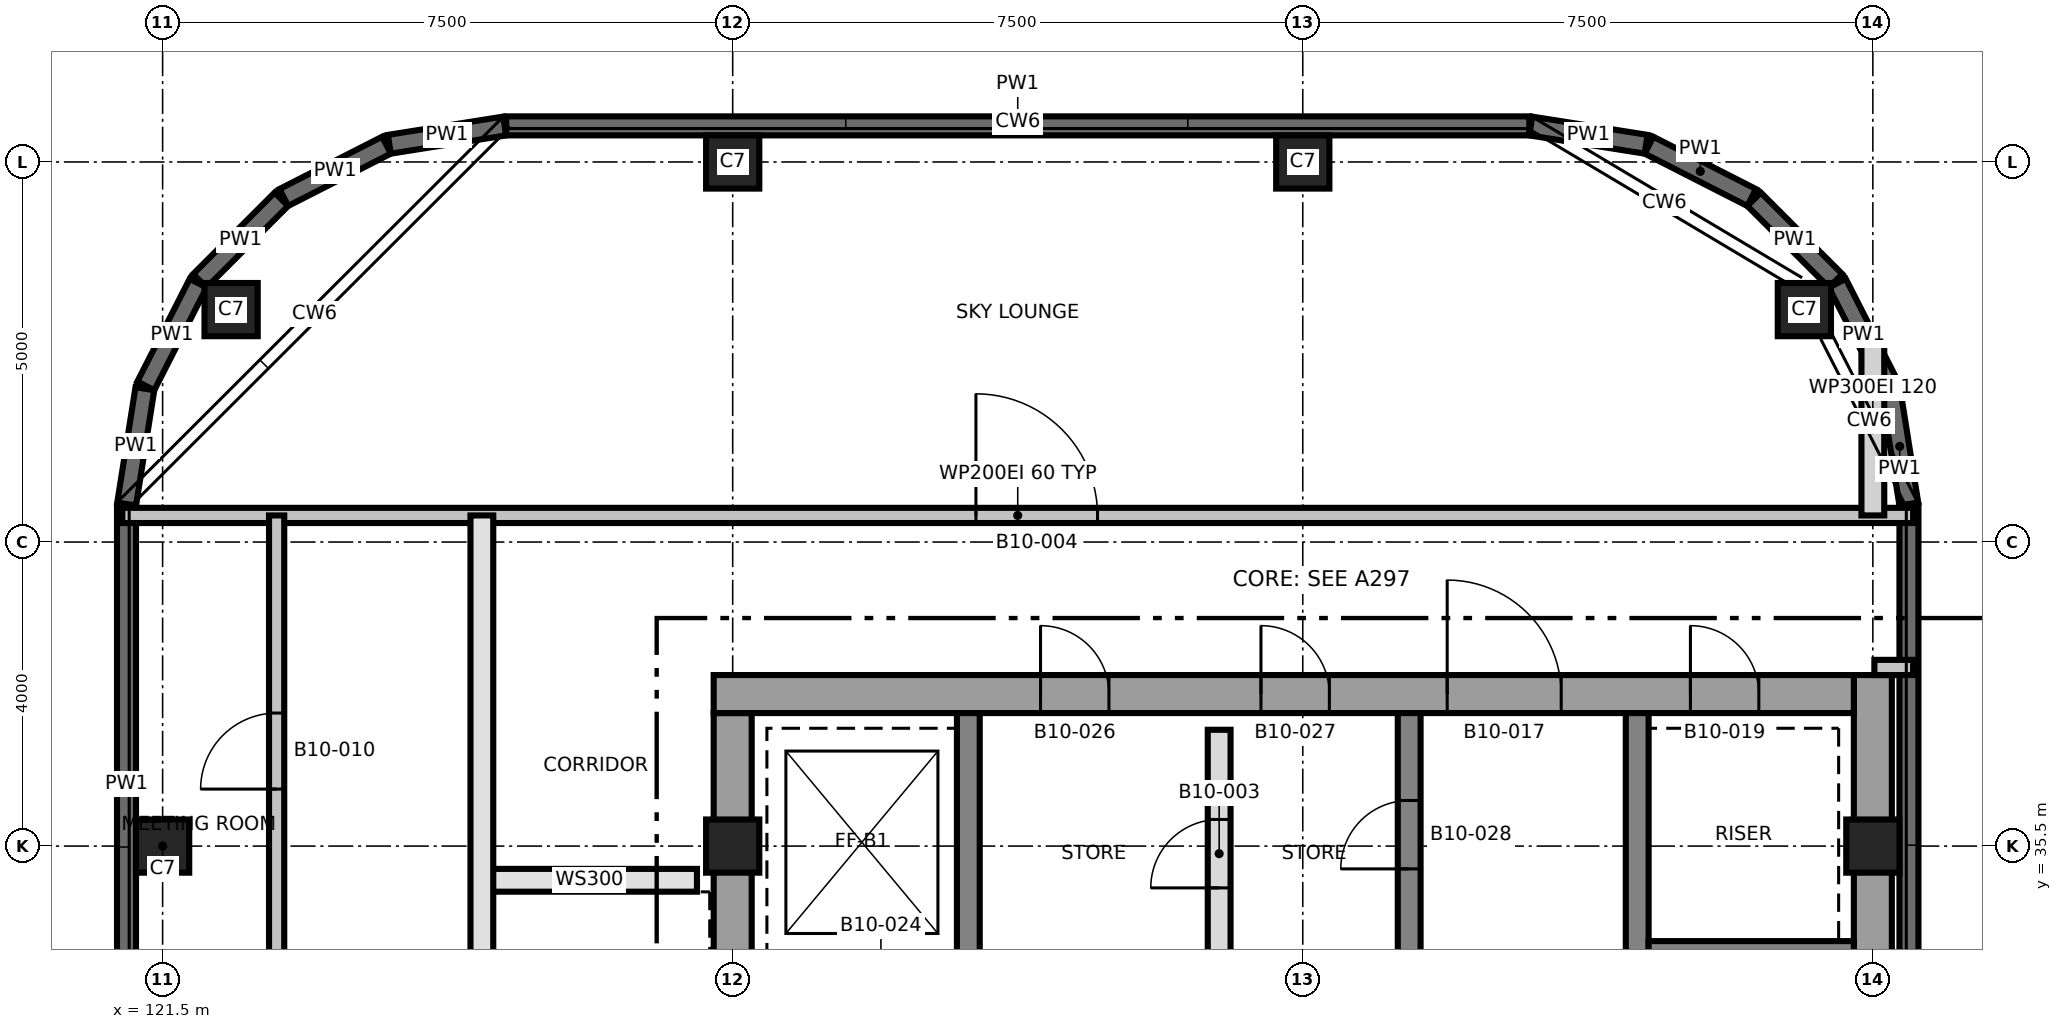
"""IFC4 building model, lengths in metres.
Left out: names, types, materials, properties, quantities, classifications, styles, units other than length and angle.
Written with IfcOpenShell. Run it as: python <this file> out.ifc"""

import sys

from ifc_helpers import new_model, si_unit, direction, frame, frame_2d, origin, origin_2d, place, context, subcontext, project, spatial, rectangle, extrude, element, fill, save


model = new_model("IFC4")
c1 = context("Model", 3, precision=1e-05, world=origin(), true_north=direction((0.0, 1.0)))
c2 = subcontext(c1, "Body", "Model", "MODEL_VIEW")
j1 = project(units=[si_unit("LENGTHUNIT", "METRE"), si_unit("PLANEANGLEUNIT", "RADIAN")], contexts=[c1])
p1 = place(None, origin())
s1 = spatial("IfcSite", under=j1, at=p1, CompositionType="ELEMENT")
p2 = place(p1, origin())
s2 = spatial("IfcBuilding", under=s1, at=p2, CompositionType="ELEMENT")
p3 = place(p2, frame((0.0, 0.0, 101.9)))
s3 = spatial("IfcBuildingStorey", under=s2, at=p3, CompositionType="ELEMENT", Elevation=101.9)
p4 = place(p3, frame((129.0, 24.75, 0.0), z_axis=(0.0, 0.0, 1.0), x_axis=(0.0, 1.0, 0.0)))
e1 = element("IfcWall", 1, at=p4, inside=s3, PredefinedType="SHEAR", context=c2, shape_type="SweptSolid", body=[
    extrude(rectangle(XDim=12.5, YDim=0.5, at=frame_2d((6.25, 0.0))), origin(), (0.0, 0.0, 1.0), 3.7),
])
p5 = place(p4, frame((5.15, 0.0, 0.0)))
e2 = element("IfcOpeningElement", 2, at=p5, cuts=e1, PredefinedType="OPENING", context=c2, shape_type="SweptSolid", body=[
    extrude(rectangle(XDim=1.0, YDim=2.1, at=frame_2d((0.5, 1.05))), frame((0.0, 0.26, 0.0), z_axis=(0.0, -1.0, 0.0), x_axis=(1.0, 0.0, 0.0)), (0.0, 0.0, 1.0), 0.52),
])
p6 = place(p3, frame((144.0, 24.25, 0.0), z_axis=(0.0, 0.0, 1.0), x_axis=(0.0, 1.0, 0.0)))
e3 = element("IfcWall", 3, at=p6, inside=s3, PredefinedType="SHEAR", context=c2, shape_type="SweptSolid", body=[
    extrude(rectangle(XDim=13.5, YDim=0.5, at=frame_2d((6.75, 0.0))), origin(), (0.0, 0.0, 1.0), 3.7),
])
p7 = place(p3, frame((128.75, 37.5, 0.0), z_axis=(0.0, 0.0, 1.0), x_axis=(1.0, 0.0, 0.0)))
e4 = element("IfcWall", 4, at=p7, inside=s3, PredefinedType="SHEAR", context=c2, shape_type="SweptSolid", body=[
    extrude(rectangle(XDim=15.0, YDim=0.5, at=frame_2d((7.5, 0.0))), origin(), (0.0, 0.0, 1.0), 3.7),
])
p8 = place(p7, frame((9.65, 0.0, 0.0)))
e5 = element("IfcOpeningElement", 5, at=p8, cuts=e4, PredefinedType="OPENING", context=c2, shape_type="SweptSolid", body=[
    extrude(rectangle(XDim=1.5, YDim=2.1, at=frame_2d((0.75, 1.05))), frame((0.0, 0.26, 0.0), z_axis=(0.0, -1.0, 0.0), x_axis=(1.0, 0.0, 0.0)), (0.0, 0.0, 1.0), 0.52),
])
p9 = place(p7, frame((12.85, 0.0, 0.0)))
e6 = element("IfcOpeningElement", 6, at=p9, cuts=e4, PredefinedType="OPENING", context=c2, shape_type="SweptSolid", body=[
    extrude(rectangle(XDim=0.9, YDim=2.1, at=frame_2d((0.45, 1.05))), frame((0.0, 0.26, 0.0), z_axis=(0.0, -1.0, 0.0), x_axis=(1.0, 0.0, 0.0)), (0.0, 0.0, 1.0), 0.52),
])
p10 = place(p7, frame((4.3, 0.0, 0.0)))
e7 = element("IfcOpeningElement", 7, at=p10, cuts=e4, PredefinedType="OPENING", context=c2, shape_type="SweptSolid", body=[
    extrude(rectangle(XDim=0.9, YDim=2.1, at=frame_2d((0.45, 1.05))), frame((0.0, 0.26, 0.0), z_axis=(0.0, -1.0, 0.0), x_axis=(1.0, 0.0, 0.0)), (0.0, 0.0, 1.0), 0.52),
])
p11 = place(p7, frame((7.2, 0.0, 0.0)))
e8 = element("IfcOpeningElement", 8, at=p11, cuts=e4, PredefinedType="OPENING", context=c2, shape_type="SweptSolid", body=[
    extrude(rectangle(XDim=0.9, YDim=2.1, at=frame_2d((0.45, 1.05))), frame((0.0, 0.26, 0.0), z_axis=(0.0, -1.0, 0.0), x_axis=(1.0, 0.0, 0.0)), (0.0, 0.0, 1.0), 0.52),
])
p12 = place(p3, frame((132.1, 24.75, 0.0), z_axis=(0.0, 0.0, 1.0), x_axis=(0.0, 1.0, 0.0)))
e9 = element("IfcWall", 9, at=p12, inside=s3, PredefinedType="SHEAR", context=c2, shape_type="SweptSolid", body=[
    extrude(rectangle(XDim=12.5, YDim=0.3, at=frame_2d((6.25, 0.0))), origin(), (0.0, 0.0, 1.0), 3.7),
])
p13 = place(p12, frame((3.9, 0.0, 0.0)))
e10 = element("IfcOpeningElement", 10, at=p13, cuts=e9, PredefinedType="OPENING", context=c2, shape_type="SweptSolid", body=[
    extrude(rectangle(XDim=1.2, YDim=2.1, at=frame_2d((0.6, 1.05))), frame((0.0, 0.16, 0.0), z_axis=(0.0, -1.0, 0.0), x_axis=(1.0, 0.0, 0.0)), (0.0, 0.0, 1.0), 0.32),
])
p14 = place(p3, frame((137.9, 24.75, 0.0), z_axis=(0.0, 0.0, 1.0), x_axis=(0.0, 1.0, 0.0)))
e11 = element("IfcWall", 11, at=p14, inside=s3, PredefinedType="SHEAR", context=c2, shape_type="SweptSolid", body=[
    extrude(rectangle(XDim=12.5, YDim=0.3, at=frame_2d((6.25, 0.0))), origin(), (0.0, 0.0, 1.0), 3.7),
])
p15 = place(p14, frame((3.95, 0.0, 0.0)))
e12 = element("IfcOpeningElement", 12, at=p15, cuts=e11, PredefinedType="OPENING", context=c2, shape_type="SweptSolid", body=[
    extrude(rectangle(XDim=1.5, YDim=2.1, at=frame_2d((0.75, 1.05))), frame((0.0, 0.16, 0.0), z_axis=(0.0, -1.0, 0.0), x_axis=(1.0, 0.0, 0.0)), (0.0, 0.0, 1.0), 0.32),
])
p16 = place(p14, frame((10.45, 0.0, 0.0)))
e13 = element("IfcOpeningElement", 13, at=p16, cuts=e11, PredefinedType="OPENING", context=c2, shape_type="SweptSolid", body=[
    extrude(rectangle(XDim=0.9, YDim=2.1, at=frame_2d((0.45, 1.05))), frame((0.0, 0.16, 0.0), z_axis=(0.0, -1.0, 0.0), x_axis=(1.0, 0.0, 0.0)), (0.0, 0.0, 1.0), 0.32),
])
p17 = place(p3, frame((140.9, 24.75, 0.0), z_axis=(0.0, 0.0, 1.0), x_axis=(0.0, 1.0, 0.0)))
e14 = element("IfcWall", 14, at=p17, inside=s3, PredefinedType="SHEAR", context=c2, shape_type="SweptSolid", body=[
    extrude(rectangle(XDim=12.5, YDim=0.3, at=frame_2d((6.25, 0.0))), origin(), (0.0, 0.0, 1.0), 3.7),
])
p18 = place(p17, frame((5.9, 0.0, 0.0)))
e15 = element("IfcOpeningElement", 15, at=p18, cuts=e14, PredefinedType="OPENING", context=c2, shape_type="SweptSolid", body=[
    extrude(rectangle(XDim=1.2, YDim=2.1, at=frame_2d((0.6, 1.05))), frame((0.0, 0.16, 0.0), z_axis=(0.0, -1.0, 0.0), x_axis=(1.0, 0.0, 0.0)), (0.0, 0.0, 1.0), 0.32),
])
p19 = place(p3, frame((141.05, 34.1, 0.0), z_axis=(0.0, 0.0, 1.0), x_axis=(1.0, 0.0, 0.0)))
e16 = element("IfcWall", 16, at=p19, inside=s3, PredefinedType="SHEAR", context=c2, shape_type="SweptSolid", body=[
    extrude(rectangle(XDim=2.7, YDim=0.3, at=frame_2d((1.35, 0.0))), origin(), (0.0, 0.0, 1.0), 3.7),
])
for number, where, z_axis, x_axis in (
    (17, (121.5, 35.5, 0.0), (0.0, 0.0, 1.0), (1.0, 0.0, 0.0)),
    (18, (129.0, 35.5, 0.0), (0.0, 0.0, 1.0), (1.0, 0.0, 0.0)),
    (19, (144.0, 35.5, 0.0), (0.0, 0.0, 1.0), (1.0, 0.0, 0.0)),
    (20, (122.401, 42.558, 0.0), (0.0, 0.0, 1.0), (1.0, 0.0, 0.0)),
    (21, (143.099, 42.558, 0.0), (0.0, 0.0, 1.0), (1.0, 0.0, 0.0)),
    (22, (129.0, 44.5, 0.0), (0.0, 0.0, 1.0), (1.0, 0.0, 0.0)),
    (23, (136.5, 44.5, 0.0), (0.0, 0.0, 1.0), (1.0, 0.0, 0.0)),
):
    element("IfcColumn", number, at=place(p3, frame(where, z_axis=z_axis, x_axis=x_axis)), inside=s3, PredefinedType="COLUMN", context=c2, shape_type="SweptSolid", body=[
        extrude(rectangle(XDim=0.7, YDim=0.7, at=origin_2d()), origin(), (0.0, 0.0, 1.0), 3.7),
    ])
p20 = place(p3, frame((144.475, 22.02, 3.7), z_axis=(0.0, 0.0, 1.0), x_axis=(0.0, 1.0, 0.0)))
e24 = element("IfcWall", 24, at=p20, inside=s3, PredefinedType="PARAPET", context=c2, shape_type="SweptSolid", body=[
    extrude(rectangle(XDim=17.96, YDim=0.25, at=frame_2d((8.98, 0.0))), origin(), (0.0, 0.0, 1.0), 1.1),
])
p21 = place(p3, frame((144.473, 40.0, 3.7), z_axis=(0.0, 0.0, 1.0), x_axis=(-0.156378762167, 0.987697161453, 0.0)))
e25 = element("IfcWall", 25, at=p21, inside=s3, PredefinedType="PARAPET", context=c2, shape_type="SweptSolid", body=[
    extrude(rectangle(XDim=1.536, YDim=0.25, at=frame_2d((0.768, 0.0))), origin(), (0.0, 0.0, 1.0), 1.1),
])
p22 = place(p3, frame((144.221, 41.554, 3.7), z_axis=(0.0, 0.0, 1.0), x_axis=(-0.453961953638, 0.891021068577, 0.0)))
e26 = element("IfcWall", 26, at=p22, inside=s3, PredefinedType="PARAPET", context=c2, shape_type="SweptSolid", body=[
    extrude(rectangle(XDim=1.517, YDim=0.25, at=frame_2d((0.758, 0.0))), origin(), (0.0, 0.0, 1.0), 1.1),
])
p23 = place(p3, frame((143.51, 42.937, 3.7), z_axis=(0.0, 0.0, 1.0), x_axis=(-0.707106781187, 0.707106781187, 0.0)))
e27 = element("IfcWall", 27, at=p23, inside=s3, PredefinedType="PARAPET", context=c2, shape_type="SweptSolid", body=[
    extrude(rectangle(XDim=1.516, YDim=0.25, at=frame_2d((0.758, 0.0))), origin(), (0.0, 0.0, 1.0), 1.1),
])
p24 = place(p3, frame((142.406, 44.032, 3.7), z_axis=(0.0, 0.0, 1.0), x_axis=(-0.891021068577, 0.453961953638, 0.0)))
e28 = element("IfcWall", 28, at=p24, inside=s3, PredefinedType="PARAPET", context=c2, shape_type="SweptSolid", body=[
    extrude(rectangle(XDim=1.517, YDim=0.25, at=frame_2d((0.758, 0.0))), origin(), (0.0, 0.0, 1.0), 1.1),
])
p25 = place(p3, frame((141.017, 44.733, 3.7), z_axis=(0.0, 0.0, 1.0), x_axis=(-0.987697161453, 0.156378762167, 0.0)))
e29 = element("IfcWall", 29, at=p25, inside=s3, PredefinedType="PARAPET", context=c2, shape_type="SweptSolid", body=[
    extrude(rectangle(XDim=1.536, YDim=0.25, at=frame_2d((0.768, 0.0))), origin(), (0.0, 0.0, 1.0), 1.1),
])
p26 = place(p3, frame((139.48, 44.975, 3.7), z_axis=(0.0, 0.0, 1.0), x_axis=(-1.0, 0.0, 0.0)))
e30 = element("IfcWall", 30, at=p26, inside=s3, PredefinedType="PARAPET", context=c2, shape_type="SweptSolid", body=[
    extrude(rectangle(XDim=13.46, YDim=0.25, at=frame_2d((6.73, 0.0))), origin(), (0.0, 0.0, 1.0), 1.1),
])
p27 = place(p3, frame((126.0, 44.973, 3.7), z_axis=(0.0, 0.0, 1.0), x_axis=(-0.987697161453, -0.156378762167, 0.0)))
e31 = element("IfcWall", 31, at=p27, inside=s3, PredefinedType="PARAPET", context=c2, shape_type="SweptSolid", body=[
    extrude(rectangle(XDim=1.536, YDim=0.25, at=frame_2d((0.768, 0.0))), origin(), (0.0, 0.0, 1.0), 1.1),
])
p28 = place(p3, frame((124.446, 44.721, 3.7), z_axis=(0.0, 0.0, 1.0), x_axis=(-0.891021068577, -0.453961953638, 0.0)))
e32 = element("IfcWall", 32, at=p28, inside=s3, PredefinedType="PARAPET", context=c2, shape_type="SweptSolid", body=[
    extrude(rectangle(XDim=1.517, YDim=0.25, at=frame_2d((0.758, 0.0))), origin(), (0.0, 0.0, 1.0), 1.1),
])
p29 = place(p3, frame((123.063, 44.01, 3.7), z_axis=(0.0, 0.0, 1.0), x_axis=(-0.707106781187, -0.707106781187, 0.0)))
e33 = element("IfcWall", 33, at=p29, inside=s3, PredefinedType="PARAPET", context=c2, shape_type="SweptSolid", body=[
    extrude(rectangle(XDim=1.516, YDim=0.25, at=frame_2d((0.758, 0.0))), origin(), (0.0, 0.0, 1.0), 1.1),
])
p30 = place(p3, frame((121.968, 42.906, 3.7), z_axis=(0.0, 0.0, 1.0), x_axis=(-0.453961953638, -0.891021068577, 0.0)))
e34 = element("IfcWall", 34, at=p30, inside=s3, PredefinedType="PARAPET", context=c2, shape_type="SweptSolid", body=[
    extrude(rectangle(XDim=1.517, YDim=0.25, at=frame_2d((0.758, 0.0))), origin(), (0.0, 0.0, 1.0), 1.1),
])
p31 = place(p3, frame((121.267, 41.517, 3.7), z_axis=(0.0, 0.0, 1.0), x_axis=(-0.156378762167, -0.987697161453, 0.0)))
e35 = element("IfcWall", 35, at=p31, inside=s3, PredefinedType="PARAPET", context=c2, shape_type="SweptSolid", body=[
    extrude(rectangle(XDim=1.536, YDim=0.25, at=frame_2d((0.768, 0.0))), origin(), (0.0, 0.0, 1.0), 1.1),
])
p32 = place(p3, frame((121.025, 39.98, 3.7), z_axis=(0.0, 0.0, 1.0), x_axis=(0.0, -1.0, 0.0)))
e36 = element("IfcWall", 36, at=p32, inside=s3, PredefinedType="PARAPET", context=c2, shape_type="SweptSolid", body=[
    extrude(rectangle(XDim=7.33, YDim=0.25, at=frame_2d((3.665, 0.0))), origin(), (0.0, 0.0, 1.0), 1.1),
])
p33 = place(p3, frame((125.7, 35.05, 0.0), z_axis=(0.0, 0.0, 1.0), x_axis=(1.0, 0.0, 0.0)))
e37 = element("IfcWall", 37, at=p33, inside=s3, PredefinedType="SOLIDWALL", context=c2, shape_type="SweptSolid", body=[
    extrude(rectangle(XDim=2.83, YDim=0.3, at=frame_2d((1.415, 0.0))), origin(), (0.0, 0.0, 1.0), 3.3),
])
p34 = place(p3, frame((144.02, 37.85, 0.0), z_axis=(0.0, 0.0, 1.0), x_axis=(1.0, 0.0, 0.0)))
e38 = element("IfcWall", 38, at=p34, inside=s3, PredefinedType="PARTITIONING", context=c2, shape_type="SweptSolid", body=[
    extrude(rectangle(XDim=0.51, YDim=0.2, at=frame_2d((0.255, 0.0))), origin(), (0.0, 0.0, 1.0), 3.3),
])
p35 = place(p3, frame((120.97, 39.85, 0.0), z_axis=(0.0, 0.0, 1.0), x_axis=(1.0, 0.0, 0.0)))
e39 = element("IfcWall", 39, at=p35, inside=s3, PredefinedType="PARTITIONING", context=c2, shape_type="SweptSolid", body=[
    extrude(rectangle(XDim=23.56, YDim=0.2, at=frame_2d((11.78, 0.0))), origin(), (0.0, 0.0, 1.0), 3.3),
])
p36 = place(p35, frame((11.23, 0.0, 0.0)))
e40 = element("IfcOpeningElement", 40, at=p36, cuts=e39, PredefinedType="OPENING", context=c2, shape_type="SweptSolid", body=[
    extrude(rectangle(XDim=1.6, YDim=2.1, at=frame_2d((0.8, 1.05))), frame((0.0, 0.11, 0.0), z_axis=(0.0, -1.0, 0.0), x_axis=(1.0, 0.0, 0.0)), (0.0, 0.0, 1.0), 0.22),
])
p37 = place(p3, frame((123.0, 22.15, 0.0), z_axis=(0.0, 0.0, 1.0), x_axis=(0.0, 1.0, 0.0)))
e41 = element("IfcWall", 41, at=p37, inside=s3, PredefinedType="PARTITIONING", context=c2, shape_type="SweptSolid", body=[
    extrude(rectangle(XDim=17.7, YDim=0.2, at=frame_2d((8.85, 0.0))), origin(), (0.0, 0.0, 1.0), 3.3),
])
p38 = place(p37, frame((7.75, 0.0, 0.0)))
e42 = element("IfcOpeningElement", 42, at=p38, cuts=e41, PredefinedType="OPENING", context=c2, shape_type="SweptSolid", body=[
    extrude(rectangle(XDim=1.2, YDim=2.1, at=frame_2d((0.6, 1.05))), frame((0.0, 0.11, 0.0), z_axis=(0.0, -1.0, 0.0), x_axis=(1.0, 0.0, 0.0)), (0.0, 0.0, 1.0), 0.22),
])
p39 = place(p37, frame((2.6, 0.0, 0.0)))
e43 = element("IfcOpeningElement", 43, at=p39, cuts=e41, PredefinedType="OPENING", context=c2, shape_type="SweptSolid", body=[
    extrude(rectangle(XDim=1.0, YDim=2.1, at=frame_2d((0.5, 1.05))), frame((0.0, 0.11, 0.0), z_axis=(0.0, -1.0, 0.0), x_axis=(1.0, 0.0, 0.0)), (0.0, 0.0, 1.0), 0.22),
])
p40 = place(p37, frame((14.1, 0.0, 0.0)))
e44 = element("IfcOpeningElement", 44, at=p40, cuts=e41, PredefinedType="OPENING", context=c2, shape_type="SweptSolid", body=[
    extrude(rectangle(XDim=1.0, YDim=2.1, at=frame_2d((0.5, 1.05))), frame((0.0, 0.11, 0.0), z_axis=(0.0, -1.0, 0.0), x_axis=(1.0, 0.0, 0.0)), (0.0, 0.0, 1.0), 0.22),
])
p41 = place(p3, frame((125.7, 22.15, 0.0), z_axis=(0.0, 0.0, 1.0), x_axis=(0.0, 1.0, 0.0)))
e45 = element("IfcWall", 45, at=p41, inside=s3, PredefinedType="SOLIDWALL", context=c2, shape_type="SweptSolid", body=[
    extrude(rectangle(XDim=17.7, YDim=0.3, at=frame_2d((8.85, 0.0))), origin(), (0.0, 0.0, 1.0), 3.3),
])
p42 = place(p41, frame((3.1, 0.0, 0.0)))
e46 = element("IfcOpeningElement", 46, at=p42, cuts=e45, PredefinedType="OPENING", context=c2, shape_type="SweptSolid", body=[
    extrude(rectangle(XDim=1.5, YDim=2.1, at=frame_2d((0.75, 1.05))), frame((0.0, 0.16, 0.0), z_axis=(0.0, -1.0, 0.0), x_axis=(1.0, 0.0, 0.0)), (0.0, 0.0, 1.0), 0.32),
])
p43 = place(p3, frame((135.4, 33.77, 0.0), z_axis=(0.0, 0.0, 1.0), x_axis=(0.0, 1.0, 0.0)))
e47 = element("IfcWall", 47, at=p43, inside=s3, PredefinedType="PARTITIONING", context=c2, shape_type="SweptSolid", body=[
    extrude(rectangle(XDim=3.26, YDim=0.3, at=frame_2d((1.63, 0.0))), origin(), (0.0, 0.0, 1.0), 3.3),
])
p44 = place(p43, frame((1.18, 0.0, 0.0)))
e48 = element("IfcOpeningElement", 48, at=p44, cuts=e47, PredefinedType="OPENING", context=c2, shape_type="SweptSolid", body=[
    extrude(rectangle(XDim=0.9, YDim=2.1, at=frame_2d((0.45, 1.05))), frame((0.0, 0.16, 0.0), z_axis=(0.0, -1.0, 0.0), x_axis=(1.0, 0.0, 0.0)), (0.0, 0.0, 1.0), 0.32),
])
p45 = place(p3, frame((144.0, 39.85, 0.0), z_axis=(0.0, 0.0, 1.0), x_axis=(0.0, 1.0, 0.0)))
e49 = element("IfcWall", 49, at=p45, inside=s3, PredefinedType="PARTITIONING", context=c2, shape_type="SweptSolid", body=[
    extrude(rectangle(XDim=2.259, YDim=0.3, at=frame_2d((1.129, 0.0))), origin(), (0.0, 0.0, 1.0), 3.3),
])
p46 = place(p44, origin())
e50 = element("IfcDoor", 50, at=p46, inside=s3, OperationType="SINGLE_SWING_LEFT", PredefinedType="DOOR", context=c2, shape_type="SweptSolid", body=[
    extrude(rectangle(XDim=0.9, YDim=2.1, at=frame_2d((0.45, 1.05))), frame((0.0, 0.025, 0.0), z_axis=(0.0, -1.0, 0.0), x_axis=(1.0, 0.0, 0.0)), (0.0, 0.0, 1.0), 0.05),
])
fill(e48, e50)
p47 = place(p36, origin())
e51 = element("IfcDoor", 51, at=p47, inside=s3, OperationType="SINGLE_SWING_RIGHT", PredefinedType="DOOR", context=c2, shape_type="SweptSolid", body=[
    extrude(rectangle(XDim=1.6, YDim=2.1, at=frame_2d((0.8, 1.05))), frame((0.0, 0.025, 0.0), z_axis=(0.0, -1.0, 0.0), x_axis=(1.0, 0.0, 0.0)), (0.0, 0.0, 1.0), 0.05),
])
fill(e40, e51)
p48 = place(p40, origin())
e52 = element("IfcDoor", 52, at=p48, inside=s3, OperationType="SINGLE_SWING_LEFT", PredefinedType="DOOR", context=c2, shape_type="SweptSolid", body=[
    extrude(rectangle(XDim=1.0, YDim=2.1, at=frame_2d((0.5, 1.05))), frame((0.0, 0.025, 0.0), z_axis=(0.0, -1.0, 0.0), x_axis=(1.0, 0.0, 0.0)), (0.0, 0.0, 1.0), 0.05),
])
fill(e44, e52)
p49 = place(p8, origin())
e53 = element("IfcDoor", 53, at=p49, inside=s3, OperationType="SINGLE_SWING_RIGHT", PredefinedType="DOOR", context=c2, shape_type="SweptSolid", body=[
    extrude(rectangle(XDim=1.5, YDim=2.1, at=frame_2d((0.75, 1.05))), frame((0.0, 0.025, 0.0), z_axis=(0.0, -1.0, 0.0), x_axis=(1.0, 0.0, 0.0)), (0.0, 0.0, 1.0), 0.05),
])
fill(e5, e53)
p50 = place(p9, origin())
e54 = element("IfcDoor", 54, at=p50, inside=s3, OperationType="SINGLE_SWING_RIGHT", PredefinedType="DOOR", context=c2, shape_type="SweptSolid", body=[
    extrude(rectangle(XDim=0.9, YDim=2.1, at=frame_2d((0.45, 1.05))), frame((0.0, 0.025, 0.0), z_axis=(0.0, -1.0, 0.0), x_axis=(1.0, 0.0, 0.0)), (0.0, 0.0, 1.0), 0.05),
])
fill(e6, e54)
p51 = place(p10, origin())
e55 = element("IfcDoor", 55, at=p51, inside=s3, OperationType="SINGLE_SWING_LEFT", PredefinedType="DOOR", context=c2, shape_type="SweptSolid", body=[
    extrude(rectangle(XDim=0.9, YDim=2.1, at=frame_2d((0.45, 1.05))), frame((0.0, 0.025, 0.0), z_axis=(0.0, -1.0, 0.0), x_axis=(1.0, 0.0, 0.0)), (0.0, 0.0, 1.0), 0.05),
])
fill(e7, e55)
p52 = place(p11, origin())
e56 = element("IfcDoor", 56, at=p52, inside=s3, OperationType="SINGLE_SWING_RIGHT", PredefinedType="DOOR", context=c2, shape_type="SweptSolid", body=[
    extrude(rectangle(XDim=0.9, YDim=2.1, at=frame_2d((0.45, 1.05))), frame((0.0, 0.025, 0.0), z_axis=(0.0, -1.0, 0.0), x_axis=(1.0, 0.0, 0.0)), (0.0, 0.0, 1.0), 0.05),
])
fill(e8, e56)
p53 = place(p16, origin())
e57 = element("IfcDoor", 57, at=p53, inside=s3, OperationType="SINGLE_SWING_RIGHT", PredefinedType="DOOR", context=c2, shape_type="SweptSolid", body=[
    extrude(rectangle(XDim=0.9, YDim=2.1, at=frame_2d((0.45, 1.05))), frame((0.0, 0.025, 0.0), z_axis=(0.0, -1.0, 0.0), x_axis=(1.0, 0.0, 0.0)), (0.0, 0.0, 1.0), 0.05),
])
fill(e13, e57)
save(model, sys.argv[1])
